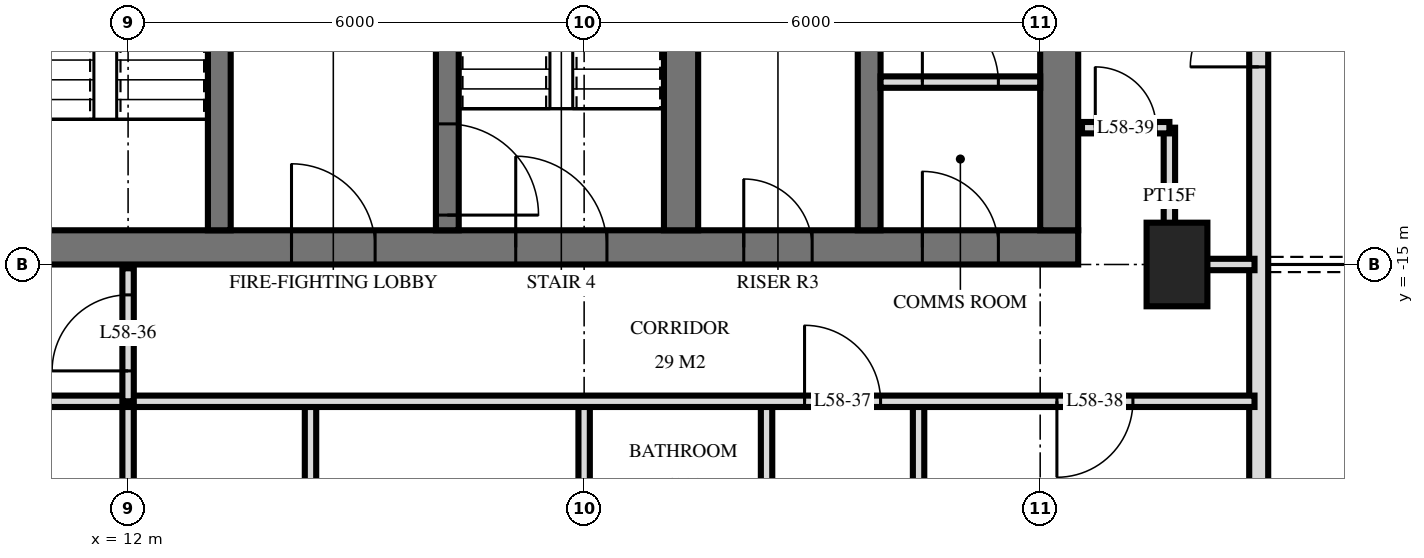
"""IFC4 building model, lengths in metres.
Left out: names, types, materials, properties, quantities, classifications, styles, units other than length and angle.
Written with IfcOpenShell. Run it as: python <this file> out.ifc"""

import sys

from ifc_helpers import new_model, si_unit, direction, frame, frame_2d, origin, origin_2d, place, context, subcontext, project, spatial, rectangle, extrude, element, fill, save


model = new_model("IFC4")
c1 = context("Model", 3, precision=1e-05, world=origin(), true_north=direction((0.0, 1.0)))
c2 = subcontext(c1, "Body", "Model", "MODEL_VIEW")
j1 = project(units=[si_unit("LENGTHUNIT", "METRE"), si_unit("PLANEANGLEUNIT", "RADIAN")], contexts=[c1])
p1 = place(None, origin())
s1 = spatial("IfcSite", under=j1, at=p1, CompositionType="ELEMENT")
p2 = place(p1, origin())
s2 = spatial("IfcBuilding", under=s1, at=p2, CompositionType="ELEMENT")
p3 = place(p2, frame((0.0, 0.0, 222.1)))
s3 = spatial("IfcBuildingStorey", under=s2, at=p3, CompositionType="ELEMENT", Elevation=222.1)
p4 = place(p3, frame((25.8, -15.0, 0.0), z_axis=(0.0, 0.0, 1.0), x_axis=(0.0, 1.0, 0.0)))
e1 = element("IfcColumn", 1, at=p4, inside=s3, PredefinedType="COLUMN", context=c2, shape_type="SweptSolid", body=[
    extrude(rectangle(XDim=1.1, YDim=0.8, at=origin_2d()), origin(), (0.0, 0.0, 1.0), 3.5),
])
p5 = place(p3, frame((10.0, -14.775, 0.0), z_axis=(0.0, 0.0, 1.0), x_axis=(1.0, 0.0, 0.0)))
e2 = element("IfcWall", 2, at=p5, inside=s3, PredefinedType="SHEAR", context=c2, shape_type="SweptSolid", body=[
    extrude(rectangle(XDim=14.5, YDim=0.45, at=frame_2d((7.25, 0.0))), origin(), (0.0, 0.0, 1.0), 3.5),
])
p6 = place(p5, frame((7.1, 0.0, 0.0)))
e3 = element("IfcOpeningElement", 3, at=p6, cuts=e2, PredefinedType="OPENING", context=c2, shape_type="SweptSolid", body=[
    extrude(rectangle(XDim=1.2, YDim=2.1, at=frame_2d((0.6, 1.05))), frame((0.0, 0.235, 0.0), z_axis=(0.0, -1.0, 0.0), x_axis=(1.0, 0.0, 0.0)), (0.0, 0.0, 1.0), 0.47),
])
p7 = place(p5, frame((4.15, 0.0, 0.0)))
e4 = element("IfcOpeningElement", 4, at=p7, cuts=e2, PredefinedType="OPENING", context=c2, shape_type="SweptSolid", body=[
    extrude(rectangle(XDim=1.1, YDim=2.1, at=frame_2d((0.55, 1.05))), frame((0.0, 0.235, 0.0), z_axis=(0.0, -1.0, 0.0), x_axis=(1.0, 0.0, 0.0)), (0.0, 0.0, 1.0), 0.47),
])
p8 = place(p5, frame((10.1, 0.0, 0.0)))
e5 = element("IfcOpeningElement", 5, at=p8, cuts=e2, PredefinedType="OPENING", context=c2, shape_type="SweptSolid", body=[
    extrude(rectangle(XDim=0.9, YDim=2.1, at=frame_2d((0.45, 1.05))), frame((0.0, 0.235, 0.0), z_axis=(0.0, -1.0, 0.0), x_axis=(1.0, 0.0, 0.0)), (0.0, 0.0, 1.0), 0.47),
])
p9 = place(p5, frame((12.45, 0.0, 0.0)))
e6 = element("IfcOpeningElement", 6, at=p9, cuts=e2, PredefinedType="OPENING", context=c2, shape_type="SweptSolid", body=[
    extrude(rectangle(XDim=1.0, YDim=2.1, at=frame_2d((0.5, 1.05))), frame((0.0, 0.235, 0.0), z_axis=(0.0, -1.0, 0.0), x_axis=(1.0, 0.0, 0.0)), (0.0, 0.0, 1.0), 0.47),
])
p10 = place(p3, frame((24.25, -14.55, 0.0), z_axis=(0.0, 0.0, 1.0), x_axis=(0.0, 1.0, 0.0)))
e7 = element("IfcWall", 7, at=p10, inside=s3, PredefinedType="SHEAR", context=c2, shape_type="SweptSolid", body=[
    extrude(rectangle(XDim=14.1, YDim=0.5, at=frame_2d((7.05, 0.0))), origin(), (0.0, 0.0, 1.0), 3.5),
])
p11 = place(p3, frame((13.2, -14.55, 0.0), z_axis=(0.0, 0.0, 1.0), x_axis=(0.0, 1.0, 0.0)))
e8 = element("IfcWall", 8, at=p11, inside=s3, PredefinedType="SHEAR", context=c2, shape_type="SweptSolid", body=[
    extrude(rectangle(XDim=5.4, YDim=0.3, at=frame_2d((2.7, 0.0))), origin(), (0.0, 0.0, 1.0), 3.5),
])
p12 = place(p11, frame((4.0, 0.0, 0.0)))
e9 = element("IfcOpeningElement", 9, at=p12, cuts=e8, PredefinedType="OPENING", context=c2, shape_type="SweptSolid", body=[
    extrude(rectangle(XDim=1.2, YDim=2.1, at=frame_2d((0.6, 1.05))), frame((0.0, 0.16, 0.0), z_axis=(0.0, -1.0, 0.0), x_axis=(1.0, 0.0, 0.0)), (0.0, 0.0, 1.0), 0.32),
])
p13 = place(p3, frame((16.2, -14.55, 0.0), z_axis=(0.0, 0.0, 1.0), x_axis=(0.0, 1.0, 0.0)))
e10 = element("IfcWall", 10, at=p13, inside=s3, PredefinedType="SHEAR", context=c2, shape_type="SweptSolid", body=[
    extrude(rectangle(XDim=5.4, YDim=0.3, at=frame_2d((2.7, 0.0))), origin(), (0.0, 0.0, 1.0), 3.5),
])
p14 = place(p13, frame((0.2, 0.0, 0.0)))
e11 = element("IfcOpeningElement", 11, at=p14, cuts=e10, PredefinedType="OPENING", context=c2, shape_type="SweptSolid", body=[
    extrude(rectangle(XDim=1.2, YDim=2.1, at=frame_2d((0.6, 1.05))), frame((0.0, 0.16, 0.0), z_axis=(0.0, -1.0, 0.0), x_axis=(1.0, 0.0, 0.0)), (0.0, 0.0, 1.0), 0.32),
])
p15 = place(p3, frame((19.275, -14.55, 0.0), z_axis=(0.0, 0.0, 1.0), x_axis=(0.0, 1.0, 0.0)))
e12 = element("IfcWall", 12, at=p15, inside=s3, PredefinedType="SHEAR", context=c2, shape_type="SweptSolid", body=[
    extrude(rectangle(XDim=5.4, YDim=0.45, at=frame_2d((2.7, 0.0))), origin(), (0.0, 0.0, 1.0), 3.5),
])
p16 = place(p3, frame((21.75, -14.55, 0.0), z_axis=(0.0, 0.0, 1.0), x_axis=(0.0, 1.0, 0.0)))
e13 = element("IfcWall", 13, at=p16, inside=s3, PredefinedType="SHEAR", context=c2, shape_type="SweptSolid", body=[
    extrude(rectangle(XDim=5.4, YDim=0.3, at=frame_2d((2.7, 0.0))), origin(), (0.0, 0.0, 1.0), 3.5),
])
p17 = place(p3, frame((26.875, -24.875, 0.0), z_axis=(0.0, 0.0, 1.0), x_axis=(0.0, 1.0, 0.0)))
e14 = element("IfcWall", 14, at=p17, inside=s3, PredefinedType="SOLIDWALL", context=c2, shape_type="SweptSolid", body=[
    extrude(rectangle(XDim=21.551, YDim=0.25, at=frame_2d((10.775, 0.0))), origin(), (0.0, 0.0, 1.0), 3.22),
])
p18 = place(p17, frame((0.575, 0.0, 0.0)))
e15 = element("IfcOpeningElement", 15, at=p18, cuts=e14, PredefinedType="OPENING", context=c2, shape_type="SweptSolid", body=[
    extrude(rectangle(XDim=1.8, YDim=2.4, at=frame_2d((0.9, 1.2))), frame((0.0, 0.135, 0.0), z_axis=(0.0, -1.0, 0.0), x_axis=(1.0, 0.0, 0.0)), (0.0, 0.0, 1.0), 0.27),
])
p19 = place(p17, frame((5.075, 0.0, 0.0)))
e16 = element("IfcOpeningElement", 16, at=p19, cuts=e14, PredefinedType="OPENING", context=c2, shape_type="SweptSolid", body=[
    extrude(rectangle(XDim=1.8, YDim=2.4, at=frame_2d((0.9, 1.2))), frame((0.0, 0.135, 0.0), z_axis=(0.0, -1.0, 0.0), x_axis=(1.0, 0.0, 0.0)), (0.0, 0.0, 1.0), 0.27),
])
p20 = place(p17, frame((12.475, 0.0, 0.0)))
e17 = element("IfcOpeningElement", 17, at=p20, cuts=e14, PredefinedType="OPENING", context=c2, shape_type="SweptSolid", body=[
    extrude(rectangle(XDim=1.8, YDim=2.4, at=frame_2d((0.9, 1.2))), frame((0.0, 0.135, 0.0), z_axis=(0.0, -1.0, 0.0), x_axis=(1.0, 0.0, 0.0)), (0.0, 0.0, 1.0), 0.27),
])
p21 = place(p3, frame((21.9, -12.6, 0.0), z_axis=(0.0, 0.0, 1.0), x_axis=(1.0, 0.0, 0.0)))
e18 = element("IfcWall", 18, at=p21, inside=s3, PredefinedType="PARTITIONING", context=c2, shape_type="SweptSolid", body=[
    extrude(rectangle(XDim=2.1, YDim=0.15, at=frame_2d((1.05, 0.0))), origin(), (0.0, 0.0, 1.0), 3.2),
])
p22 = place(p21, frame((0.55, 0.0, 0.0)))
e19 = element("IfcOpeningElement", 19, at=p22, cuts=e18, PredefinedType="OPENING", context=c2, shape_type="SweptSolid", body=[
    extrude(rectangle(XDim=1.0, YDim=2.1, at=frame_2d((0.5, 1.05))), frame((0.0, 0.085, 0.0), z_axis=(0.0, -1.0, 0.0), x_axis=(1.0, 0.0, 0.0)), (0.0, 0.0, 1.0), 0.17),
])
p23 = place(p3, frame((25.7, -15.0, 0.0), z_axis=(0.0, 0.0, 1.0), x_axis=(0.0, 1.0, 0.0)))
e20 = element("IfcWall", 20, at=p23, inside=s3, PredefinedType="PARTITIONING", context=c2, shape_type="SweptSolid", body=[
    extrude(rectangle(XDim=1.8, YDim=0.15, at=frame_2d((0.9, 0.0))), origin(), (0.0, 0.0, 1.0), 3.22),
])
p24 = place(p3, frame((22.4, -21.0, 0.0), z_axis=(0.0, 0.0, 1.0), x_axis=(0.0, 1.0, 0.0)))
e21 = element("IfcWall", 21, at=p24, inside=s3, PredefinedType="PARTITIONING", context=c2, shape_type="SweptSolid", body=[
    extrude(rectangle(XDim=4.2, YDim=0.15, at=frame_2d((2.1, 0.0))), origin(), (0.0, 0.0, 1.0), 3.22),
])
p25 = place(p3, frame((20.4, -21.0, 0.0), z_axis=(0.0, 0.0, 1.0), x_axis=(0.0, 1.0, 0.0)))
e22 = element("IfcWall", 22, at=p25, inside=s3, PredefinedType="PARTITIONING", context=c2, shape_type="SweptSolid", body=[
    extrude(rectangle(XDim=4.2, YDim=0.15, at=frame_2d((2.1, 0.0))), origin(), (0.0, 0.0, 1.0), 3.22),
])
p26 = place(p25, frame((1.6, 0.0, 0.0)))
e23 = element("IfcOpeningElement", 23, at=p26, cuts=e22, PredefinedType="OPENING", context=c2, shape_type="SweptSolid", body=[
    extrude(rectangle(XDim=1.0, YDim=2.1, at=frame_2d((0.5, 1.05))), frame((0.0, 0.085, 0.0), z_axis=(0.0, -1.0, 0.0), x_axis=(1.0, 0.0, 0.0)), (0.0, 0.0, 1.0), 0.17),
])
for number, where, z_axis, x_axis in (
    (24, (18.0, -21.0, 0.0), (0.0, 0.0, 1.0), (0.0, 1.0, 0.0)),
    (25, (14.4, -21.0, 0.0), (0.0, 0.0, 1.0), (0.0, 1.0, 0.0)),
):
    element("IfcWall", number, at=place(p3, frame(where, z_axis=z_axis, x_axis=x_axis)), inside=s3, PredefinedType="PARTITIONING", context=c2, shape_type="SweptSolid", body=[
        extrude(rectangle(XDim=4.2, YDim=0.15, at=frame_2d((2.1, 0.0))), origin(), (0.0, 0.0, 1.0), 3.22),
    ])
p27 = place(p3, frame((12.0, -16.8, 0.0), z_axis=(0.0, 0.0, 1.0), x_axis=(0.0, 1.0, 0.0)))
e26 = element("IfcWall", 26, at=p27, inside=s3, PredefinedType="PARTITIONING", context=c2, shape_type="SweptSolid", body=[
    extrude(rectangle(XDim=1.75, YDim=0.15, at=frame_2d((0.875, 0.0))), origin(), (0.0, 0.0, 1.0), 3.22),
])
p28 = place(p27, frame((0.4, 0.0, 0.0)))
e27 = element("IfcOpeningElement", 27, at=p28, cuts=e26, PredefinedType="OPENING", context=c2, shape_type="SweptSolid", body=[
    extrude(rectangle(XDim=1.0, YDim=2.1, at=frame_2d((0.5, 1.05))), frame((0.0, 0.085, 0.0), z_axis=(0.0, -1.0, 0.0), x_axis=(1.0, 0.0, 0.0)), (0.0, 0.0, 1.0), 0.17),
])
p29 = place(p3, frame((12.0, -29.22, 0.0), z_axis=(0.0, 0.0, 1.0), x_axis=(0.0, 1.0, 0.0)))
e28 = element("IfcWall", 28, at=p29, inside=s3, PredefinedType="PARTITIONING", context=c2, shape_type="SweptSolid", body=[
    extrude(rectangle(XDim=12.42, YDim=0.15, at=frame_2d((6.21, 0.0))), origin(), (0.0, 0.0, 1.0), 3.22),
])
p30 = place(p3, frame((-26.82, -16.8, 0.0), z_axis=(0.0, 0.0, 1.0), x_axis=(1.0, 0.0, 0.0)))
e29 = element("IfcWall", 29, at=p30, inside=s3, PredefinedType="PARTITIONING", context=c2, shape_type="SweptSolid", body=[
    extrude(rectangle(XDim=53.64, YDim=0.15, at=frame_2d((26.82, 0.0))), origin(), (0.0, 0.0, 1.0), 3.22),
])
p31 = place(p30, frame((11.17, 0.0, 0.0)))
e30 = element("IfcOpeningElement", 30, at=p31, cuts=e29, PredefinedType="OPENING", context=c2, shape_type="SweptSolid", body=[
    extrude(rectangle(XDim=1.0, YDim=2.1, at=frame_2d((0.5, 1.05))), frame((0.0, 0.085, 0.0), z_axis=(0.0, -1.0, 0.0), x_axis=(1.0, 0.0, 0.0)), (0.0, 0.0, 1.0), 0.17),
])
p32 = place(p30, frame((3.22, 0.0, 0.0)))
e31 = element("IfcOpeningElement", 31, at=p32, cuts=e29, PredefinedType="OPENING", context=c2, shape_type="SweptSolid", body=[
    extrude(rectangle(XDim=1.0, YDim=2.1, at=frame_2d((0.5, 1.05))), frame((0.0, 0.085, 0.0), z_axis=(0.0, -1.0, 0.0), x_axis=(1.0, 0.0, 0.0)), (0.0, 0.0, 1.0), 0.17),
])
p33 = place(p30, frame((5.02, 0.0, 0.0)))
e32 = element("IfcOpeningElement", 32, at=p33, cuts=e29, PredefinedType="OPENING", context=c2, shape_type="SweptSolid", body=[
    extrude(rectangle(XDim=1.0, YDim=2.1, at=frame_2d((0.5, 1.05))), frame((0.0, 0.085, 0.0), z_axis=(0.0, -1.0, 0.0), x_axis=(1.0, 0.0, 0.0)), (0.0, 0.0, 1.0), 0.17),
])
p34 = place(p30, frame((47.72, 0.0, 0.0)))
e33 = element("IfcOpeningElement", 33, at=p34, cuts=e29, PredefinedType="OPENING", context=c2, shape_type="SweptSolid", body=[
    extrude(rectangle(XDim=1.0, YDim=2.1, at=frame_2d((0.5, 1.05))), frame((0.0, 0.085, 0.0), z_axis=(0.0, -1.0, 0.0), x_axis=(1.0, 0.0, 0.0)), (0.0, 0.0, 1.0), 0.17),
])
p35 = place(p30, frame((51.04, 0.0, 0.0)))
e34 = element("IfcOpeningElement", 34, at=p35, cuts=e29, PredefinedType="OPENING", context=c2, shape_type="SweptSolid", body=[
    extrude(rectangle(XDim=1.0, YDim=2.1, at=frame_2d((0.5, 1.05))), frame((0.0, 0.085, 0.0), z_axis=(0.0, -1.0, 0.0), x_axis=(1.0, 0.0, 0.0)), (0.0, 0.0, 1.0), 0.17),
])
p36 = place(p30, frame((17.32, 0.0, 0.0)))
e35 = element("IfcOpeningElement", 35, at=p36, cuts=e29, PredefinedType="OPENING", context=c2, shape_type="SweptSolid", body=[
    extrude(rectangle(XDim=1.0, YDim=2.1, at=frame_2d((0.5, 1.05))), frame((0.0, 0.085, 0.0), z_axis=(0.0, -1.0, 0.0), x_axis=(1.0, 0.0, 0.0)), (0.0, 0.0, 1.0), 0.17),
])
p37 = place(p30, frame((26.32, 0.0, 0.0)))
e36 = element("IfcOpeningElement", 36, at=p37, cuts=e29, PredefinedType="OPENING", context=c2, shape_type="SweptSolid", body=[
    extrude(rectangle(XDim=1.0, YDim=2.1, at=frame_2d((0.5, 1.05))), frame((0.0, 0.085, 0.0), z_axis=(0.0, -1.0, 0.0), x_axis=(1.0, 0.0, 0.0)), (0.0, 0.0, 1.0), 0.17),
])
p38 = place(p30, frame((35.32, 0.0, 0.0)))
e37 = element("IfcOpeningElement", 37, at=p38, cuts=e29, PredefinedType="OPENING", context=c2, shape_type="SweptSolid", body=[
    extrude(rectangle(XDim=1.0, YDim=2.1, at=frame_2d((0.5, 1.05))), frame((0.0, 0.085, 0.0), z_axis=(0.0, -1.0, 0.0), x_axis=(1.0, 0.0, 0.0)), (0.0, 0.0, 1.0), 0.17),
])
p39 = place(p3, frame((25.7, -15.0, 0.0), z_axis=(0.0, 0.0, 1.0), x_axis=(1.0, 0.0, 0.0)))
e38 = element("IfcWall", 38, at=p39, inside=s3, PredefinedType="PARTITIONING", context=c2, shape_type="SweptSolid", body=[
    extrude(rectangle(XDim=1.12, YDim=0.15, at=frame_2d((0.56, 0.0))), origin(), (0.0, 0.0, 1.0), 3.22),
])
p40 = place(p3, frame((24.55, -13.2, 0.0), z_axis=(0.0, 0.0, 1.0), x_axis=(1.0, 0.0, 0.0)))
e39 = element("IfcWall", 39, at=p40, inside=s3, PredefinedType="PARTITIONING", context=c2, shape_type="SweptSolid", body=[
    extrude(rectangle(XDim=1.15, YDim=0.15, at=frame_2d((0.575, 0.0))), origin(), (0.0, 0.0, 1.0), 3.22),
])
p41 = place(p40, frame((0.175, 0.0, 0.0)))
e40 = element("IfcOpeningElement", 40, at=p41, cuts=e39, PredefinedType="OPENING", context=c2, shape_type="SweptSolid", body=[
    extrude(rectangle(XDim=0.8, YDim=2.1, at=frame_2d((0.4, 1.05))), frame((0.0, 0.085, 0.0), z_axis=(0.0, -1.0, 0.0), x_axis=(1.0, 0.0, 0.0)), (0.0, 0.0, 1.0), 0.17),
])
p42 = place(p20, origin())
e41 = element("IfcDoor", 41, at=p42, inside=s3, OperationType="DOUBLE_DOOR_SINGLE_SWING", PredefinedType="DOOR", context=c2, shape_type="SweptSolid", body=[
    extrude(rectangle(XDim=1.8, YDim=2.4, at=frame_2d((0.9, 1.2))), frame((0.0, 0.025, 0.0), z_axis=(0.0, -1.0, 0.0), x_axis=(1.0, 0.0, 0.0)), (0.0, 0.0, 1.0), 0.05),
])
fill(e17, e41)
p43 = place(p6, origin())
e42 = element("IfcDoor", 42, at=p43, inside=s3, OperationType="SINGLE_SWING_RIGHT", PredefinedType="DOOR", context=c2, shape_type="SweptSolid", body=[
    extrude(rectangle(XDim=1.2, YDim=2.1, at=frame_2d((0.6, 1.05))), frame((0.0, 0.025, 0.0), z_axis=(0.0, -1.0, 0.0), x_axis=(1.0, 0.0, 0.0)), (0.0, 0.0, 1.0), 0.05),
])
fill(e3, e42)
p44 = place(p7, origin())
e43 = element("IfcDoor", 43, at=p44, inside=s3, OperationType="SINGLE_SWING_RIGHT", PredefinedType="DOOR", context=c2, shape_type="SweptSolid", body=[
    extrude(rectangle(XDim=1.1, YDim=2.1, at=frame_2d((0.55, 1.05))), frame((0.0, 0.025, 0.0), z_axis=(0.0, -1.0, 0.0), x_axis=(1.0, 0.0, 0.0)), (0.0, 0.0, 1.0), 0.05),
])
fill(e4, e43)
p45 = place(p8, origin())
e44 = element("IfcDoor", 44, at=p45, inside=s3, OperationType="SINGLE_SWING_RIGHT", PredefinedType="DOOR", context=c2, shape_type="SweptSolid", body=[
    extrude(rectangle(XDim=0.9, YDim=2.1, at=frame_2d((0.45, 1.05))), frame((0.0, 0.025, 0.0), z_axis=(0.0, -1.0, 0.0), x_axis=(1.0, 0.0, 0.0)), (0.0, 0.0, 1.0), 0.05),
])
fill(e5, e44)
p46 = place(p9, origin())
e45 = element("IfcDoor", 45, at=p46, inside=s3, OperationType="SINGLE_SWING_RIGHT", PredefinedType="DOOR", context=c2, shape_type="SweptSolid", body=[
    extrude(rectangle(XDim=1.0, YDim=2.1, at=frame_2d((0.5, 1.05))), frame((0.0, 0.025, 0.0), z_axis=(0.0, -1.0, 0.0), x_axis=(1.0, 0.0, 0.0)), (0.0, 0.0, 1.0), 0.05),
])
fill(e6, e45)
p47 = place(p14, frame((0.6, 0.0, 0.0), z_axis=(0.0, 0.0, 1.0), x_axis=(-1.0, 0.0, 0.0)))
e46 = element("IfcDoor", 46, at=p47, inside=s3, OperationType="SINGLE_SWING_LEFT", PredefinedType="DOOR", context=c2, shape_type="SweptSolid", body=[
    extrude(rectangle(XDim=1.2, YDim=2.1, at=frame_2d((0.0, 1.05))), frame((0.0, -0.025, 0.0), z_axis=(0.0, 1.0, 0.0), x_axis=(-1.0, 0.0, 0.0)), (0.0, 0.0, 1.0), 0.05),
])
fill(e11, e46)
p48 = place(p22, origin())
e47 = element("IfcDoor", 47, at=p48, inside=s3, OperationType="SINGLE_SWING_RIGHT", PredefinedType="DOOR", context=c2, shape_type="SweptSolid", body=[
    extrude(rectangle(XDim=1.0, YDim=2.1, at=frame_2d((0.5, 1.05))), frame((0.0, 0.025, 0.0), z_axis=(0.0, -1.0, 0.0), x_axis=(1.0, 0.0, 0.0)), (0.0, 0.0, 1.0), 0.05),
])
fill(e19, e47)
p49 = place(p28, origin())
e48 = element("IfcDoor", 48, at=p49, inside=s3, OperationType="SINGLE_SWING_RIGHT", PredefinedType="DOOR", context=c2, shape_type="SweptSolid", body=[
    extrude(rectangle(XDim=1.0, YDim=2.1, at=frame_2d((0.5, 1.05))), frame((0.0, 0.025, 0.0), z_axis=(0.0, -1.0, 0.0), x_axis=(1.0, 0.0, 0.0)), (0.0, 0.0, 1.0), 0.05),
])
fill(e27, e48)
p50 = place(p34, origin())
e49 = element("IfcDoor", 49, at=p50, inside=s3, OperationType="SINGLE_SWING_RIGHT", PredefinedType="DOOR", context=c2, shape_type="SweptSolid", body=[
    extrude(rectangle(XDim=1.0, YDim=2.1, at=frame_2d((0.5, 1.05))), frame((0.0, 0.025, 0.0), z_axis=(0.0, -1.0, 0.0), x_axis=(1.0, 0.0, 0.0)), (0.0, 0.0, 1.0), 0.05),
])
fill(e33, e49)
p51 = place(p35, frame((0.5, 0.0, 0.0), z_axis=(0.0, 0.0, 1.0), x_axis=(-1.0, 0.0, 0.0)))
e50 = element("IfcDoor", 50, at=p51, inside=s3, OperationType="SINGLE_SWING_LEFT", PredefinedType="DOOR", context=c2, shape_type="SweptSolid", body=[
    extrude(rectangle(XDim=1.0, YDim=2.1, at=frame_2d((0.0, 1.05))), frame((0.0, -0.025, 0.0), z_axis=(0.0, 1.0, 0.0), x_axis=(-1.0, 0.0, 0.0)), (0.0, 0.0, 1.0), 0.05),
])
fill(e34, e50)
p52 = place(p41, origin())
e51 = element("IfcDoor", 51, at=p52, inside=s3, OperationType="SINGLE_SWING_RIGHT", PredefinedType="DOOR", context=c2, shape_type="SweptSolid", body=[
    extrude(rectangle(XDim=0.8, YDim=2.1, at=frame_2d((0.4, 1.05))), frame((0.0, 0.025, 0.0), z_axis=(0.0, -1.0, 0.0), x_axis=(1.0, 0.0, 0.0)), (0.0, 0.0, 1.0), 0.05),
])
fill(e40, e51)
save(model, sys.argv[1])
